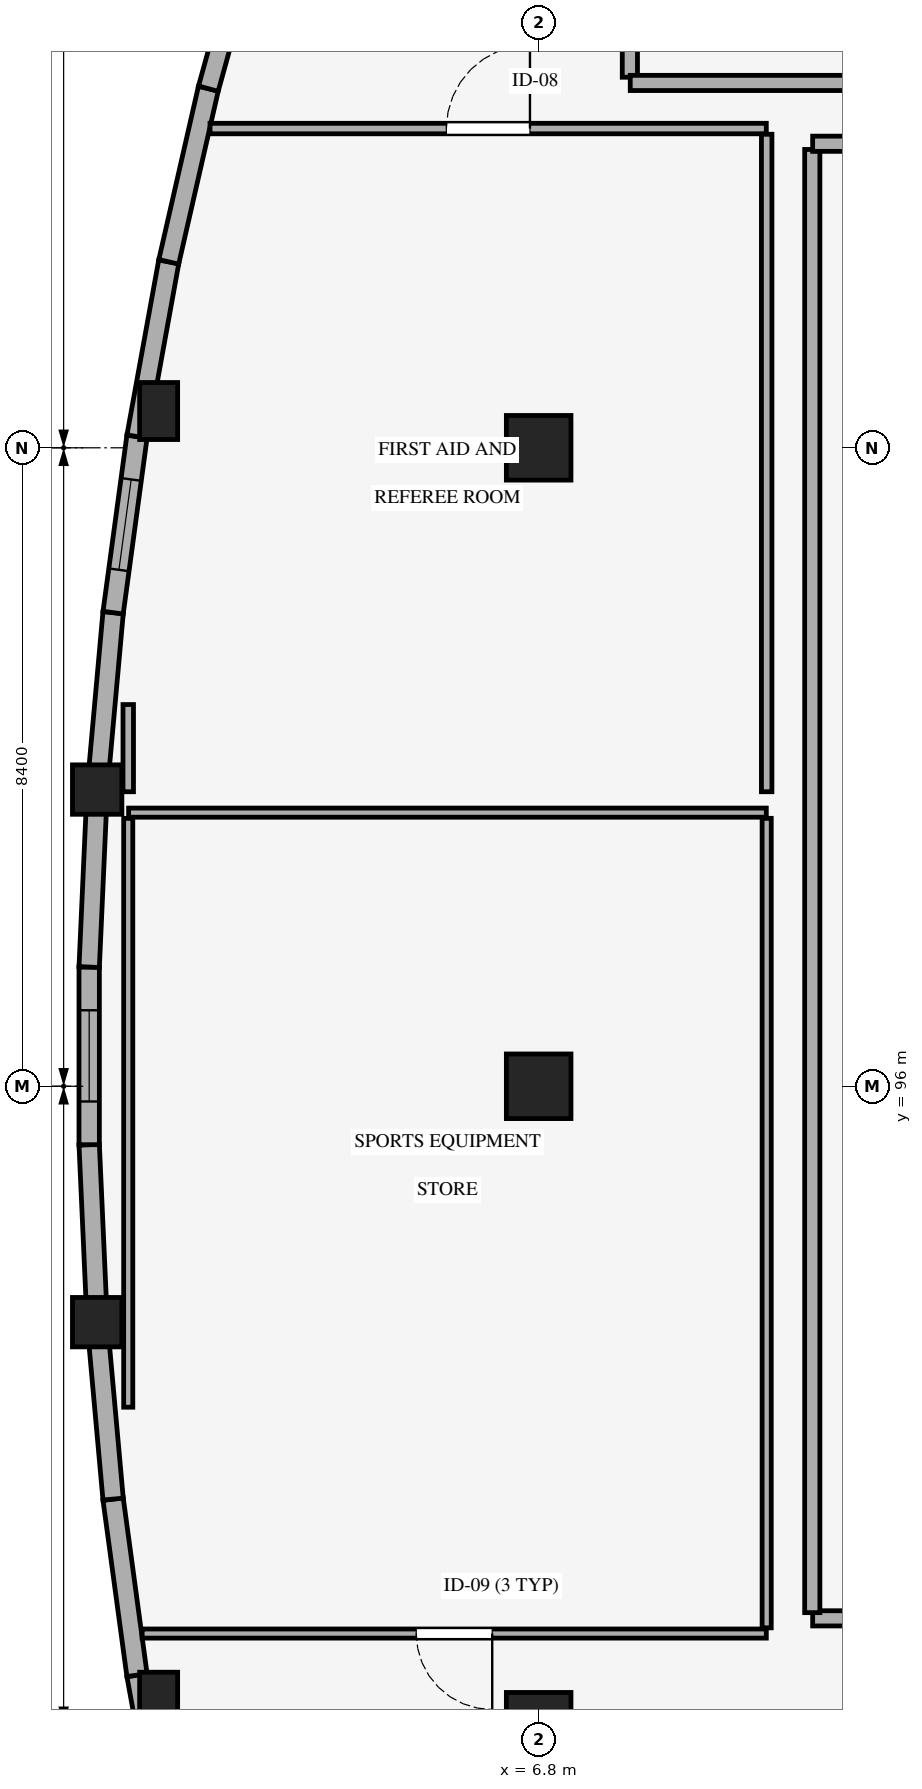
"""IFC4 building model, lengths in metres.
Left out: names, types, materials, properties, quantities, classifications, styles, units other than length and angle.
Written with IfcOpenShell. Run it as: python <this file> out.ifc"""

import sys

from ifc_helpers import new_model, si_unit, direction, frame, frame_2d, origin, origin_2d, place, context, subcontext, project, spatial, rectangle, circle, extrude, element, fill, save


model = new_model("IFC4")
c1 = context("Model", 3, precision=1e-05, world=origin(), true_north=direction((0.0, 1.0)))
c2 = subcontext(c1, "Body", "Model", "MODEL_VIEW")
j1 = project(units=[si_unit("LENGTHUNIT", "METRE"), si_unit("PLANEANGLEUNIT", "RADIAN")], contexts=[c1])
p1 = place(None, origin())
s1 = spatial("IfcSite", under=j1, at=p1, CompositionType="ELEMENT")
p2 = place(p1, origin())
s2 = spatial("IfcBuilding", under=s1, at=p2, CompositionType="ELEMENT")
p3 = place(p2, origin())
s3 = spatial("IfcBuildingStorey", under=s2, at=p3, CompositionType="ELEMENT", Elevation=0.0)
for number, where, z_axis, x_axis in (
    (1, (0.991, 92.896, 0.0), (0.0, 0.0, 1.0), (1.0, 0.0, 0.0)),
    (2, (0.991, 99.903, 0.0), (0.0, 0.0, 1.0), (1.0, 0.0, 0.0)),
):
    element("IfcColumn", number, at=place(p3, frame(where, z_axis=z_axis, x_axis=x_axis)), inside=s3, PredefinedType="COLUMN", context=c2, shape_type="SweptSolid", body=[
        extrude(circle(Radius=0.325, at=origin_2d()), origin(), (0.0, 0.0, 1.0), 4.8),
    ])
for number, where, z_axis, x_axis in (
    (3, (1.8, 87.916, 0.0), (0.0, 0.0, 1.0), (1.0, 0.0, 0.0)),
    (4, (1.8, 104.884, 0.0), (0.0, 0.0, 1.0), (1.0, 0.0, 0.0)),
):
    element("IfcColumn", number, at=place(p3, frame(where, z_axis=z_axis, x_axis=x_axis)), inside=s3, PredefinedType="COLUMN", context=c2, shape_type="SweptSolid", body=[
        extrude(rectangle(XDim=0.5, YDim=0.75, at=origin_2d()), origin(), (0.0, 0.0, 1.0), 4.8),
    ])
for number, where, z_axis, x_axis in (
    (5, (6.8, 87.6, 0.0), (0.0, 0.0, 1.0), (1.0, 0.0, 0.0)),
    (6, (6.8, 96.0, 0.0), (0.0, 0.0, 1.0), (1.0, 0.0, 0.0)),
    (7, (6.8, 104.4, 0.0), (0.0, 0.0, 1.0), (1.0, 0.0, 0.0)),
):
    element("IfcColumn", number, at=place(p3, frame(where, z_axis=z_axis, x_axis=x_axis)), inside=s3, PredefinedType="COLUMN", context=c2, shape_type="SweptSolid", body=[
        extrude(rectangle(XDim=0.85, YDim=0.85, at=origin_2d()), origin(), (0.0, 0.0, 1.0), 4.8),
    ])
p4 = place(p3, frame((1.933, 85.954, 0.0), z_axis=(0.0, 0.0, 1.0), x_axis=(-0.178848665452, 0.983876595344, 0.0)))
e8 = element("IfcWall", 8, at=p4, inside=s3, PredefinedType="STANDARD", context=c2, shape_type="SweptSolid", body=[
    extrude(rectangle(XDim=2.337, YDim=0.268, at=frame_2d((1.168, 0.0))), origin(), (0.0, 0.0, 1.0), 3.82),
])
for number, where, z_axis, x_axis in (
    (9, (1.515, 88.253, 0.0), (0.0, 0.0, 1.0), (-0.134, 0.991, 0.0)),
    (10, (1.201, 90.569, 0.0), (0.0, 0.0, 1.0), (-0.09, 0.996, 0.0)),
):
    element("IfcWall", number, at=place(p3, frame(where, z_axis=z_axis, x_axis=x_axis)), inside=s3, PredefinedType="STANDARD", context=c2, shape_type="SweptSolid", body=[
        extrude(rectangle(XDim=2.337, YDim=0.268, at=frame_2d((1.168, 0.0))), origin(), (0.0, 0.0, 1.0), 3.82),
    ])
p5 = place(p3, frame((0.991, 92.896, 0.0), z_axis=(0.0, 0.0, 1.0), x_axis=(-0.045019136319, 0.998986124711, 0.0)))
e11 = element("IfcWall", 11, at=p5, inside=s3, PredefinedType="STANDARD", context=c2, shape_type="SweptSolid", body=[
    extrude(rectangle(XDim=2.337, YDim=0.268, at=frame_2d((1.169, 0.0))), origin(), (0.0, 0.0, 1.0), 3.82),
])
p6 = place(p3, frame((0.886, 95.231, 0.0), z_axis=(0.0, 0.0, 1.0), x_axis=(0.0, 1.0, 0.0)))
e12 = element("IfcWall", 12, at=p6, inside=s3, PredefinedType="STANDARD", context=c2, shape_type="SweptSolid", body=[
    extrude(rectangle(XDim=2.337, YDim=0.268, at=frame_2d((1.168, 0.0))), origin(), (0.0, 0.0, 1.0), 3.82),
])
p7 = place(p6, frame((0.569, 0.0, 0.9)))
e13 = element("IfcOpeningElement", 13, at=p7, cuts=e12, PredefinedType="OPENING", context=c2, shape_type="SweptSolid", body=[
    extrude(rectangle(XDim=1.2, YDim=1.8, at=frame_2d((0.6, 0.9))), frame((0.0, 0.144, 0.0), z_axis=(0.0, -1.0, 0.0), x_axis=(1.0, 0.0, 0.0)), (0.0, 0.0, 1.0), 0.288),
])
p8 = place(p3, frame((0.886, 97.569, 0.0), z_axis=(0.0, 0.0, 1.0), x_axis=(0.045023834413, 0.998985912981, 0.0)))
e14 = element("IfcWall", 14, at=p8, inside=s3, PredefinedType="STANDARD", context=c2, shape_type="SweptSolid", body=[
    extrude(rectangle(XDim=2.337, YDim=0.268, at=frame_2d((1.168, 0.0))), origin(), (0.0, 0.0, 1.0), 3.82),
])
p9 = place(p3, frame((0.991, 99.903, 0.0), z_axis=(0.0, 0.0, 1.0), x_axis=(0.089725771447, 0.995966508442, 0.0)))
e15 = element("IfcWall", 15, at=p9, inside=s3, PredefinedType="STANDARD", context=c2, shape_type="SweptSolid", body=[
    extrude(rectangle(XDim=2.337, YDim=0.268, at=frame_2d((1.169, 0.0))), origin(), (0.0, 0.0, 1.0), 3.82),
])
p10 = place(p3, frame((1.201, 102.231, 0.0), z_axis=(0.0, 0.0, 1.0), x_axis=(0.134441908153, 0.990921476875, 0.0)))
e16 = element("IfcWall", 16, at=p10, inside=s3, PredefinedType="STANDARD", context=c2, shape_type="SweptSolid", body=[
    extrude(rectangle(XDim=2.337, YDim=0.268, at=frame_2d((1.168, 0.0))), origin(), (0.0, 0.0, 1.0), 3.82),
])
p11 = place(p10, frame((0.569, 0.0, 0.9)))
e17 = element("IfcOpeningElement", 17, at=p11, cuts=e16, PredefinedType="OPENING", context=c2, shape_type="SweptSolid", body=[
    extrude(rectangle(XDim=1.2, YDim=1.8, at=frame_2d((0.6, 0.9))), frame((0.0, 0.144, 0.0), z_axis=(0.0, -1.0, 0.0), x_axis=(1.0, 0.0, 0.0)), (0.0, 0.0, 1.0), 0.288),
])
p12 = place(p3, frame((1.515, 104.547, 0.0), z_axis=(0.0, 0.0, 1.0), x_axis=(0.178848665452, 0.983876595344, 0.0)))
e18 = element("IfcWall", 18, at=p12, inside=s3, PredefinedType="STANDARD", context=c2, shape_type="SweptSolid", body=[
    extrude(rectangle(XDim=2.337, YDim=0.268, at=frame_2d((1.168, 0.0))), origin(), (0.0, 0.0, 1.0), 3.82),
])
p13 = place(p3, frame((1.933, 106.846, 0.0), z_axis=(0.0, 0.0, 1.0), x_axis=(0.222898540551, 0.974841648998, 0.0)))
e19 = element("IfcWall", 19, at=p13, inside=s3, PredefinedType="STANDARD", context=c2, shape_type="SweptSolid", body=[
    extrude(rectangle(XDim=2.337, YDim=0.268, at=frame_2d((1.169, 0.0))), origin(), (0.0, 0.0, 1.0), 3.82),
])
p14 = place(p3, frame((2.454, 109.125, 0.0), z_axis=(0.0, 0.0, 1.0), x_axis=(0.266377520109, 0.963868775706, 0.0)))
e20 = element("IfcWall", 20, at=p14, inside=s3, PredefinedType="STANDARD", context=c2, shape_type="SweptSolid", body=[
    extrude(rectangle(XDim=2.337, YDim=0.268, at=frame_2d((1.168, 0.0))), origin(), (0.0, 0.0, 1.0), 3.82),
])
p15 = place(p14, frame((0.569, 0.0, 0.9)))
e21 = element("IfcOpeningElement", 21, at=p15, cuts=e20, PredefinedType="OPENING", context=c2, shape_type="SweptSolid", body=[
    extrude(rectangle(XDim=1.2, YDim=1.8, at=frame_2d((0.6, 0.9))), frame((0.0, 0.144, 0.0), z_axis=(0.0, -1.0, 0.0), x_axis=(1.0, 0.0, 0.0)), (0.0, 0.0, 1.0), 0.288),
])
p16 = place(p3, frame((32.595, 89.0, 0.0), z_axis=(0.0, 0.0, 1.0), x_axis=(-1.0, 0.0, 0.0)))
e22 = element("IfcWall", 22, at=p16, inside=s3, PredefinedType="STANDARD", context=c2, shape_type="SweptSolid", body=[
    extrude(rectangle(XDim=22.19, YDim=0.2, at=frame_2d((11.095, 0.0))), origin(), (0.0, 0.0, 1.0), 4.49),
])
p17 = place(p16, frame((9.425, 0.0, 0.0)))
e23 = element("IfcOpeningElement", 23, at=p17, cuts=e22, PredefinedType="OPENING", context=c2, shape_type="SweptSolid", body=[
    extrude(rectangle(XDim=1.7, YDim=2.3, at=frame_2d((0.85, 1.15))), frame((0.0, 0.11, 0.0), z_axis=(0.0, -1.0, 0.0), x_axis=(1.0, 0.0, 0.0)), (0.0, 0.0, 1.0), 0.22),
])
p18 = place(p3, frame((10.4, 89.075, 0.0), z_axis=(0.0, 0.0, 1.0), x_axis=(0.0, 1.0, 0.0)))
e24 = element("IfcWall", 24, at=p18, inside=s3, PredefinedType="STANDARD", context=c2, shape_type="SweptSolid", body=[
    extrude(rectangle(XDim=19.25, YDim=0.2, at=frame_2d((9.625, 0.0))), origin(), (0.0, 0.0, 1.0), 4.49),
])
p19 = place(p3, frame((10.405, 108.4, 0.0), z_axis=(0.0, 0.0, 1.0), x_axis=(1.0, 0.0, 0.0)))
e25 = element("IfcWall", 25, at=p19, inside=s3, PredefinedType="STANDARD", context=c2, shape_type="SweptSolid", body=[
    extrude(rectangle(XDim=22.19, YDim=0.2, at=frame_2d((11.095, 0.0))), origin(), (0.0, 0.0, 1.0), 4.49),
])
p20 = place(p3, frame((9.795, 88.8, 0.0), z_axis=(0.0, 0.0, 1.0), x_axis=(-1.0, 0.0, 0.0)))
e26 = element("IfcWall", 26, at=p20, inside=s3, PredefinedType="STANDARD", context=c2, shape_type="SweptSolid", body=[
    extrude(rectangle(XDim=8.212, YDim=0.12, at=frame_2d((4.106, 0.0))), origin(), (0.0, 0.0, 1.0), 3.82),
])
p21 = place(p20, frame((3.606, 0.0, 0.0)))
e27 = element("IfcOpeningElement", 27, at=p21, cuts=e26, PredefinedType="OPENING", context=c2, shape_type="SweptSolid", body=[
    extrude(rectangle(XDim=1.0, YDim=2.1, at=frame_2d((0.5, 1.05))), frame((0.0, 0.07, 0.0), z_axis=(0.0, -1.0, 0.0), x_axis=(1.0, 0.0, 0.0)), (0.0, 0.0, 1.0), 0.14),
])
p22 = place(p3, frame((1.4, 91.778, 0.0), z_axis=(0.0, 0.0, 1.0), x_axis=(0.0, 1.0, 0.0)))
e28 = element("IfcWall", 28, at=p22, inside=s3, PredefinedType="STANDARD", context=c2, shape_type="SweptSolid", body=[
    extrude(rectangle(XDim=7.747, YDim=0.12, at=frame_2d((3.874, 0.0))), origin(), (0.0, 0.0, 1.0), 3.82),
])
p23 = place(p3, frame((1.405, 99.6, 0.0), z_axis=(0.0, 0.0, 1.0), x_axis=(1.0, 0.0, 0.0)))
e29 = element("IfcWall", 29, at=p23, inside=s3, PredefinedType="STANDARD", context=c2, shape_type="SweptSolid", body=[
    extrude(rectangle(XDim=8.39, YDim=0.12, at=frame_2d((4.195, 0.0))), origin(), (0.0, 0.0, 1.0), 3.62),
])
p24 = place(p3, frame((9.8, 99.525, 0.0), z_axis=(0.0, 0.0, 1.0), x_axis=(0.0, -1.0, 0.0)))
e30 = element("IfcWall", 30, at=p24, inside=s3, PredefinedType="STANDARD", context=c2, shape_type="SweptSolid", body=[
    extrude(rectangle(XDim=10.65, YDim=0.12, at=frame_2d((5.325, 0.0))), origin(), (0.0, 0.0, 1.0), 4.49),
])
p25 = place(p3, frame((1.4, 99.875, 0.0), z_axis=(0.0, 0.0, 1.0), x_axis=(0.0, 1.0, 0.0)))
e31 = element("IfcWall", 31, at=p25, inside=s3, PredefinedType="STANDARD", context=c2, shape_type="SweptSolid", body=[
    extrude(rectangle(XDim=1.147, YDim=0.138, at=frame_2d((0.573, 0.0))), origin(), (0.0, 0.0, 1.0), 3.82),
])
p26 = place(p3, frame((2.476, 108.6, 0.0), z_axis=(0.0, 0.0, 1.0), x_axis=(1.0, 0.0, 0.0)))
e32 = element("IfcWall", 32, at=p26, inside=s3, PredefinedType="STANDARD", context=c2, shape_type="SweptSolid", body=[
    extrude(rectangle(XDim=7.319, YDim=0.138, at=frame_2d((3.659, 0.0))), origin(), (0.0, 0.0, 1.0), 3.82),
])
p27 = place(p26, frame((3.11, 0.0, 0.0)))
e33 = element("IfcOpeningElement", 33, at=p27, cuts=e32, PredefinedType="OPENING", context=c2, shape_type="SweptSolid", body=[
    extrude(rectangle(XDim=1.1, YDim=2.2, at=frame_2d((0.55, 1.1))), frame((0.0, 0.079, 0.0), z_axis=(0.0, -1.0, 0.0), x_axis=(1.0, 0.0, 0.0)), (0.0, 0.0, 1.0), 0.158),
])
p28 = place(p3, frame((9.8, 108.525, 0.0), z_axis=(0.0, 0.0, 1.0), x_axis=(0.0, -1.0, 0.0)))
e34 = element("IfcWall", 34, at=p28, inside=s3, PredefinedType="STANDARD", context=c2, shape_type="SweptSolid", body=[
    extrude(rectangle(XDim=8.65, YDim=0.138, at=frame_2d((4.325, 0.0))), origin(), (0.0, 0.0, 1.0), 4.49),
])
p29 = place(p3, frame((8.0, 109.275, 0.0), z_axis=(0.0, 0.0, 1.0), x_axis=(0.0, 1.0, 0.0)))
e35 = element("IfcWall", 35, at=p29, inside=s3, PredefinedType="STANDARD", context=c2, shape_type="SweptSolid", body=[
    extrude(rectangle(XDim=5.91, YDim=0.2, at=frame_2d((2.955, 0.0))), origin(), (0.0, 0.0, 1.0), 3.62),
])
p30 = place(p29, frame((2.947, 0.0, 0.0)))
e36 = element("IfcOpeningElement", 36, at=p30, cuts=e35, PredefinedType="OPENING", context=c2, shape_type="SweptSolid", body=[
    extrude(rectangle(XDim=1.7, YDim=2.3, at=frame_2d((0.85, 1.15))), frame((0.0, 0.11, 0.0), z_axis=(0.0, -1.0, 0.0), x_axis=(1.0, 0.0, 0.0)), (0.0, 0.0, 1.0), 0.22),
])
p31 = place(p3, frame((31.595, 109.2, 0.0), z_axis=(0.0, 0.0, 1.0), x_axis=(-1.0, 0.0, 0.0)))
e37 = element("IfcWall", 37, at=p31, inside=s3, PredefinedType="STANDARD", context=c2, shape_type="SweptSolid", body=[
    extrude(rectangle(XDim=23.59, YDim=0.2, at=frame_2d((11.795, 0.0))), origin(), (0.0, 0.0, 1.0), 4.49),
])
p32 = place(p7, origin())
e38 = element("IfcWindow", 38, at=p32, inside=s3, PartitioningType="SINGLE_PANEL", PredefinedType="WINDOW", context=c2, shape_type="SweptSolid", body=[
    extrude(rectangle(XDim=1.2, YDim=1.8, at=frame_2d((0.6, 0.9))), frame((0.0, 0.03, 0.0), z_axis=(0.0, -1.0, 0.0), x_axis=(1.0, 0.0, 0.0)), (0.0, 0.0, 1.0), 0.06),
])
fill(e13, e38)
p33 = place(p11, origin())
e39 = element("IfcWindow", 39, at=p33, inside=s3, PartitioningType="SINGLE_PANEL", PredefinedType="WINDOW", context=c2, shape_type="SweptSolid", body=[
    extrude(rectangle(XDim=1.2, YDim=1.8, at=frame_2d((0.6, 0.9))), frame((0.0, 0.03, 0.0), z_axis=(0.0, -1.0, 0.0), x_axis=(1.0, 0.0, 0.0)), (0.0, 0.0, 1.0), 0.06),
])
fill(e17, e39)
p34 = place(p21, origin())
e40 = element("IfcDoor", 40, at=p34, inside=s3, OperationType="SINGLE_SWING_LEFT", PredefinedType="DOOR", context=c2, shape_type="SweptSolid", body=[
    extrude(rectangle(XDim=1.0, YDim=2.1, at=frame_2d((0.5, 1.05))), frame((0.0, 0.025, 0.0), z_axis=(0.0, -1.0, 0.0), x_axis=(1.0, 0.0, 0.0)), (0.0, 0.0, 1.0), 0.05),
])
fill(e27, e40)
p35 = place(p27, origin())
e41 = element("IfcDoor", 41, at=p35, inside=s3, OperationType="SINGLE_SWING_RIGHT", PredefinedType="DOOR", context=c2, shape_type="SweptSolid", body=[
    extrude(rectangle(XDim=1.1, YDim=2.2, at=frame_2d((0.55, 1.1))), frame((0.0, 0.025, 0.0), z_axis=(0.0, -1.0, 0.0), x_axis=(1.0, 0.0, 0.0)), (0.0, 0.0, 1.0), 0.05),
])
fill(e33, e41)
save(model, sys.argv[1])
